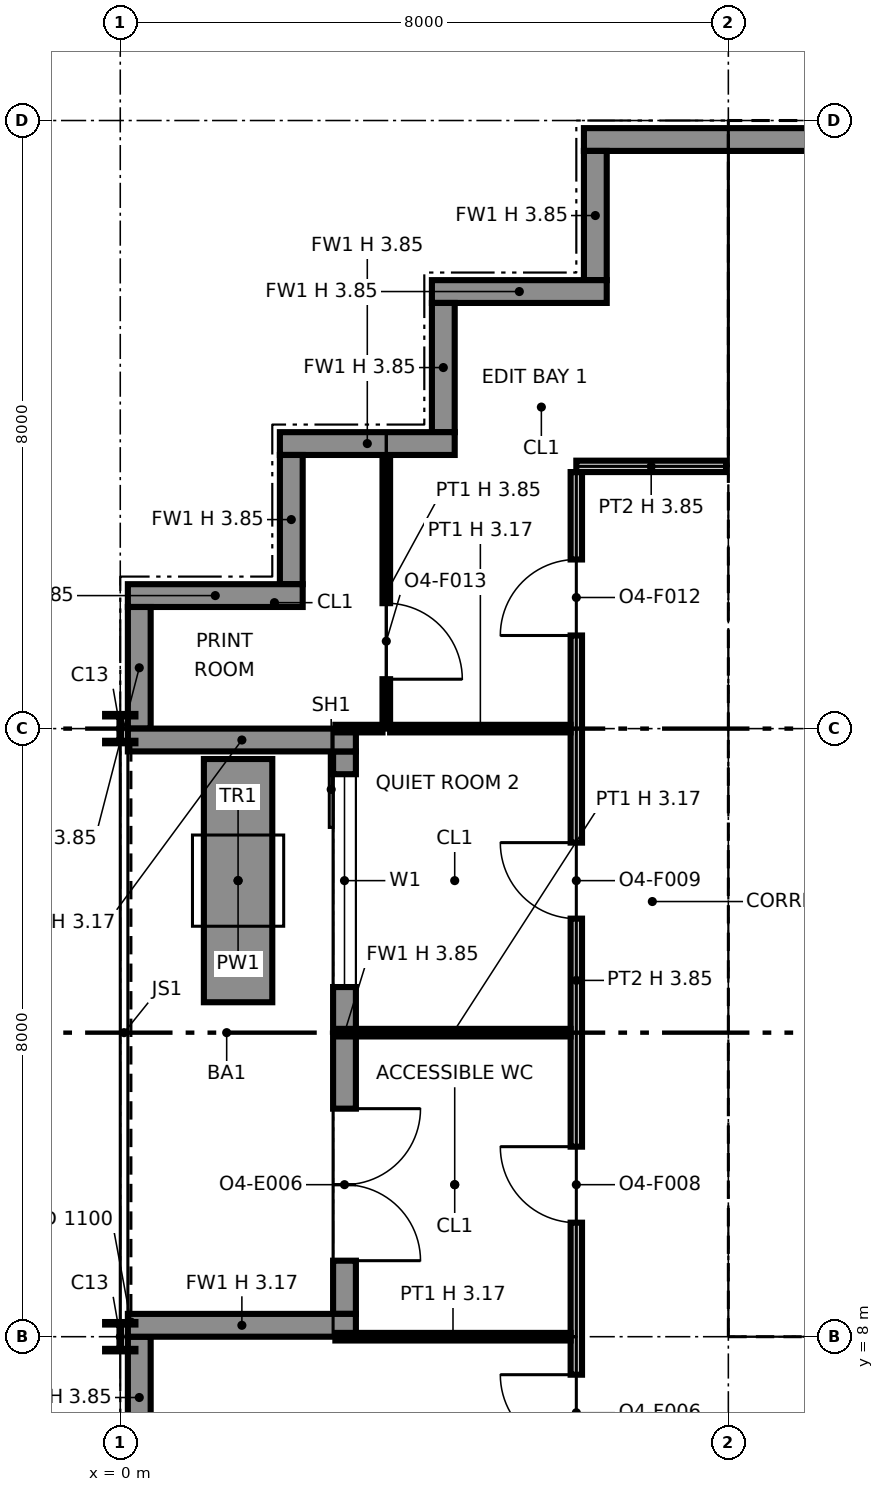
"""IFC4 building model, lengths in metres.
Left out: names, types, materials, properties, quantities, classifications, styles, units other than length and angle.
Written with IfcOpenShell. Run it as: python <this file> out.ifc"""

import sys

from ifc_helpers import new_model, si_unit, direction, frame, frame_2d, origin, origin_2d, place, context, subcontext, project, spatial, polyline, rectangle, i_section, outline, extrude, element, fill, save


model = new_model("IFC4")
c1 = context("Model", 3, precision=1e-05, world=origin(), true_north=direction((0.0, 1.0)))
c2 = subcontext(c1, "Body", "Model", "MODEL_VIEW")
j1 = project(units=[si_unit("LENGTHUNIT", "METRE"), si_unit("PLANEANGLEUNIT", "RADIAN")], contexts=[c1])
p1 = place(None, origin())
s1 = spatial("IfcSite", under=j1, at=p1, CompositionType="ELEMENT")
p2 = place(p1, origin())
s2 = spatial("IfcBuilding", under=s1, at=p2, CompositionType="ELEMENT")
p3 = place(p2, frame((0.0, 0.0, 217.0)))
s3 = spatial("IfcBuildingStorey", under=s2, at=p3, CompositionType="ELEMENT", Elevation=217.0)
for number, where, z_axis, x_axis in (
    (1, (0.0, 8.0, 0.0), (0.0, 0.0, 1.0), (1.0, 0.0, 0.0)),
    (2, (0.0, 16.0, 0.0), (0.0, 0.0, 1.0), (1.0, 0.0, 0.0)),
):
    element("IfcColumn", number, at=place(p3, frame(where, z_axis=z_axis, x_axis=x_axis)), inside=s3, PredefinedType="COLUMN", context=c2, shape_type="SweptSolid", body=[
        extrude(i_section(OverallWidth=0.399, OverallDepth=0.386, WebThickness=0.021, FlangeThickness=0.033, at=origin_2d()), origin(), (0.0, 0.0, 1.0), 3.85),
    ])
for number, where, z_axis, x_axis in (
    (3, (8.0, 8.0, 0.0), (0.0, 0.0, 1.0), (1.0, 0.0, 0.0)),
    (4, (8.0, 16.0, 0.0), (0.0, 0.0, 1.0), (1.0, 0.0, 0.0)),
):
    element("IfcColumn", number, at=place(p3, frame(where, z_axis=z_axis, x_axis=x_axis)), inside=s3, PredefinedType="COLUMN", context=c2, shape_type="SweptSolid", body=[
        extrude(i_section(OverallWidth=0.373, OverallDepth=0.368, WebThickness=0.015, FlangeThickness=0.024, at=origin_2d()), origin(), (0.0, 0.0, 1.0), 3.85),
    ])
p4 = place(p3, frame((8.0, 24.0, 0.0), z_axis=(0.0, 0.0, 1.0), x_axis=(1.0, 0.0, 0.0)))
e5 = element("IfcColumn", 5, at=p4, inside=s3, PredefinedType="COLUMN", context=c2, shape_type="SweptSolid", body=[
    extrude(i_section(OverallWidth=0.406, OverallDepth=0.417, WebThickness=0.03, FlangeThickness=0.048, at=origin_2d()), origin(), (0.0, 0.0, 1.0), 3.85),
])
p5 = place(p3, frame((32.0, 23.75, 0.0), z_axis=(0.0, 0.0, 1.0), x_axis=(-1.0, 0.0, 0.0)))
e6 = element("IfcWall", 6, at=p5, inside=s3, PredefinedType="SOLIDWALL", context=c2, shape_type="SweptSolid", body=[
    extrude(rectangle(XDim=25.9, YDim=0.3, at=frame_2d((12.95, 0.0))), origin(), (0.0, 0.0, 1.0), 3.85),
])
p6 = place(p3, frame((6.25, 23.6, 0.0), z_axis=(0.0, 0.0, 1.0), x_axis=(0.0, -1.0, 0.0)))
e7 = element("IfcWall", 7, at=p6, inside=s3, PredefinedType="SOLIDWALL", context=c2, shape_type="SweptSolid", body=[
    extrude(rectangle(XDim=1.7, YDim=0.3, at=frame_2d((0.85, 0.0))), origin(), (0.0, 0.0, 1.0), 3.85),
])
p7 = place(p3, frame((6.4, 21.75, 0.0), z_axis=(0.0, 0.0, 1.0), x_axis=(-1.0, 0.0, 0.0)))
e8 = element("IfcWall", 8, at=p7, inside=s3, PredefinedType="SOLIDWALL", context=c2, shape_type="SweptSolid", body=[
    extrude(rectangle(XDim=2.3, YDim=0.3, at=frame_2d((1.15, 0.0))), origin(), (0.0, 0.0, 1.0), 3.85),
])
p8 = place(p3, frame((4.25, 21.6, 0.0), z_axis=(0.0, 0.0, 1.0), x_axis=(0.0, -1.0, 0.0)))
e9 = element("IfcWall", 9, at=p8, inside=s3, PredefinedType="SOLIDWALL", context=c2, shape_type="SweptSolid", body=[
    extrude(rectangle(XDim=1.7, YDim=0.3, at=frame_2d((0.85, 0.0))), origin(), (0.0, 0.0, 1.0), 3.85),
])
p9 = place(p3, frame((4.4, 19.75, 0.0), z_axis=(0.0, 0.0, 1.0), x_axis=(-1.0, 0.0, 0.0)))
e10 = element("IfcWall", 10, at=p9, inside=s3, PredefinedType="SOLIDWALL", context=c2, shape_type="SweptSolid", body=[
    extrude(rectangle(XDim=2.3, YDim=0.3, at=frame_2d((1.15, 0.0))), origin(), (0.0, 0.0, 1.0), 3.85),
])
p10 = place(p3, frame((2.25, 19.6, 0.0), z_axis=(0.0, 0.0, 1.0), x_axis=(0.0, -1.0, 0.0)))
e11 = element("IfcWall", 11, at=p10, inside=s3, PredefinedType="SOLIDWALL", context=c2, shape_type="SweptSolid", body=[
    extrude(rectangle(XDim=1.7, YDim=0.3, at=frame_2d((0.85, 0.0))), origin(), (0.0, 0.0, 1.0), 3.85),
])
p11 = place(p3, frame((2.4, 17.75, 0.0), z_axis=(0.0, 0.0, 1.0), x_axis=(-1.0, 0.0, 0.0)))
e12 = element("IfcWall", 12, at=p11, inside=s3, PredefinedType="SOLIDWALL", context=c2, shape_type="SweptSolid", body=[
    extrude(rectangle(XDim=2.3, YDim=0.3, at=frame_2d((1.15, 0.0))), origin(), (0.0, 0.0, 1.0), 3.85),
])
p12 = place(p3, frame((0.25, 17.6, 0.0), z_axis=(0.0, 0.0, 1.0), x_axis=(0.0, -1.0, 0.0)))
e13 = element("IfcWall", 13, at=p12, inside=s3, PredefinedType="SOLIDWALL", context=c2, shape_type="SweptSolid", body=[
    extrude(rectangle(XDim=1.6, YDim=0.3, at=frame_2d((0.8, 0.0))), origin(), (0.0, 0.0, 1.0), 3.85),
])
p13 = place(p3, frame((2.95, 15.7, 0.0), z_axis=(0.0, 0.0, 1.0), x_axis=(0.0, -1.0, 0.0)))
e14 = element("IfcWall", 14, at=p13, inside=s3, PredefinedType="SOLIDWALL", context=c2, shape_type="SweptSolid", body=[
    extrude(rectangle(XDim=7.4, YDim=0.3, at=frame_2d((3.7, 0.0))), origin(), (0.0, 0.0, 1.0), 3.85),
])
p14 = place(p13, frame((0.3, 0.0, 0.9)))
e15 = element("IfcOpeningElement", 15, at=p14, cuts=e14, PredefinedType="OPENING", context=c2, shape_type="SweptSolid", body=[
    extrude(rectangle(XDim=2.8, YDim=2.2, at=frame_2d((1.4, 1.1))), frame((0.0, 0.16, 0.0), z_axis=(0.0, -1.0, 0.0), x_axis=(1.0, 0.0, 0.0)), (0.0, 0.0, 1.0), 0.32),
])
p15 = place(p13, frame((4.7, 0.0, 0.0)))
e16 = element("IfcOpeningElement", 16, at=p15, cuts=e14, PredefinedType="OPENING", context=c2, shape_type="SweptSolid", body=[
    extrude(rectangle(XDim=2.0, YDim=2.4, at=frame_2d((1.0, 1.2))), frame((0.0, 0.16, 0.0), z_axis=(0.0, -1.0, 0.0), x_axis=(1.0, 0.0, 0.0)), (0.0, 0.0, 1.0), 0.32),
])
for number, where, z_axis, x_axis in (
    (17, (0.1, 15.85, 0.0), (0.0, 0.0, 1.0), (1.0, 0.0, 0.0)),
    (18, (0.1, 8.15, 0.0), (0.0, 0.0, 1.0), (1.0, 0.0, 0.0)),
):
    element("IfcWall", number, at=place(p3, frame(where, z_axis=z_axis, x_axis=x_axis)), inside=s3, PredefinedType="SOLIDWALL", context=c2, shape_type="SweptSolid", body=[
        extrude(rectangle(XDim=3.0, YDim=0.3, at=frame_2d((1.5, 0.0))), origin(), (0.0, 0.0, 1.0), 3.171),
    ])
p16 = place(p3, frame((0.25, 8.0, 0.0), z_axis=(0.0, 0.0, 1.0), x_axis=(0.0, -1.0, 0.0)))
e19 = element("IfcWall", 19, at=p16, inside=s3, PredefinedType="SOLIDWALL", context=c2, shape_type="SweptSolid", body=[
    extrude(rectangle(XDim=1.6, YDim=0.3, at=frame_2d((0.8, 0.0))), origin(), (0.0, 0.0, 1.0), 3.85),
])
p17 = place(p3, frame((1.55, 15.6, 0.0), z_axis=(0.0, 0.0, 1.0), x_axis=(0.0, -1.0, 0.0)))
e20 = element("IfcWall", 20, at=p17, inside=s3, PredefinedType="SOLIDWALL", context=c2, shape_type="SweptSolid", body=[
    extrude(rectangle(XDim=3.2, YDim=0.9, at=frame_2d((1.6, 0.0))), origin(), (0.0, 0.0, 1.0), 0.6),
])
p18 = place(p3, frame((8.65, 8.75, 0.0), z_axis=(0.0, 0.0, 1.0), x_axis=(1.0, 0.0, 0.0)))
e21 = element("IfcWall", 21, at=p18, inside=s3, PredefinedType="PARTITIONING", context=c2, shape_type="SweptSolid", body=[
    extrude(outline(polyline([(0.0, 0.0), (14.7, 0.0), (14.7, 3.85), (7.438, 3.85), (7.438, 3.308), (7.262, 3.308), (7.261, 3.85), (0.0, 3.85), (0.0, 0.0)])), frame((0.0, 0.1, 0.0), z_axis=(0.0, -1.0, 0.0), x_axis=(1.0, 0.0, 0.0)), (0.0, 0.0, 1.0), 0.2),
])
p19 = place(p18, frame((1.3, 0.0, 0.0)))
e22 = element("IfcOpeningElement", 22, at=p19, cuts=e21, PredefinedType="OPENING", context=c2, shape_type="SweptSolid", body=[
    extrude(rectangle(XDim=1.4, YDim=2.1, at=frame_2d((0.7, 1.05))), frame((0.0, 0.11, 0.0), z_axis=(0.0, -1.0, 0.0), x_axis=(1.0, 0.0, 0.0)), (0.0, 0.0, 1.0), 0.22),
])
p20 = place(p18, frame((4.6, 0.0, 0.0)))
e23 = element("IfcOpeningElement", 23, at=p20, cuts=e21, PredefinedType="OPENING", context=c2, shape_type="SweptSolid", body=[
    extrude(rectangle(XDim=1.4, YDim=2.1, at=frame_2d((0.7, 1.05))), frame((0.0, 0.11, 0.0), z_axis=(0.0, -1.0, 0.0), x_axis=(1.0, 0.0, 0.0)), (0.0, 0.0, 1.0), 0.22),
])
p21 = place(p18, frame((10.4, 0.0, 0.0)))
e24 = element("IfcOpeningElement", 24, at=p21, cuts=e21, PredefinedType="OPENING", context=c2, shape_type="SweptSolid", body=[
    extrude(rectangle(XDim=1.2, YDim=2.1, at=frame_2d((0.6, 1.05))), frame((0.0, 0.11, 0.0), z_axis=(0.0, -1.0, 0.0), x_axis=(1.0, 0.0, 0.0)), (0.0, 0.0, 1.0), 0.22),
])
p22 = place(p3, frame((8.75, 8.85, 0.0), z_axis=(0.0, 0.0, 1.0), x_axis=(0.0, 1.0, 0.0)))
e25 = element("IfcWall", 25, at=p22, inside=s3, PredefinedType="PARTITIONING", context=c2, shape_type="SweptSolid", body=[
    extrude(outline(polyline([(0.0, 0.0), (14.3, 0.0), (14.3, 3.85), (10.225, 3.85), (10.224, 3.44), (10.076, 3.44), (10.075, 3.85), (7.239, 3.85), (7.238, 3.308), (7.062, 3.308), (7.062, 3.85), (0.0, 3.85), (0.0, 0.0)])), frame((0.0, 0.1, 0.0), z_axis=(0.0, -1.0, 0.0), x_axis=(1.0, 0.0, 0.0)), (0.0, 0.0, 1.0), 0.2),
])
p23 = place(p22, frame((8.3, 0.0, 0.0)))
e26 = element("IfcOpeningElement", 26, at=p23, cuts=e25, PredefinedType="OPENING", context=c2, shape_type="SweptSolid", body=[
    extrude(rectangle(XDim=1.8, YDim=2.1, at=frame_2d((0.9, 1.05))), frame((0.0, 0.11, 0.0), z_axis=(0.0, -1.0, 0.0), x_axis=(1.0, 0.0, 0.0)), (0.0, 0.0, 1.0), 0.22),
])
p24 = place(p3, frame((8.65, 23.25, 0.0), z_axis=(0.0, 0.0, 1.0), x_axis=(1.0, 0.0, 0.0)))
e27 = element("IfcWall", 27, at=p24, inside=s3, PredefinedType="PARTITIONING", context=c2, shape_type="SweptSolid", body=[
    extrude(outline(polyline([(0.0, 0.0), (14.7, 0.0), (14.7, 3.85), (7.438, 3.85), (7.438, 3.308), (7.262, 3.308), (7.261, 3.85), (0.0, 3.85), (0.0, 0.0)])), frame((0.0, 0.1, 0.0), z_axis=(0.0, -1.0, 0.0), x_axis=(1.0, 0.0, 0.0)), (0.0, 0.0, 1.0), 0.2),
])
p25 = place(p3, frame((8.85, 16.0, 0.0), z_axis=(0.0, 0.0, 1.0), x_axis=(1.0, 0.0, 0.0)))
e28 = element("IfcWall", 28, at=p25, inside=s3, PredefinedType="PARTITIONING", context=c2, shape_type="SweptSolid", body=[
    extrude(rectangle(XDim=6.953, YDim=0.6, at=frame_2d((3.477, 0.0))), origin(), (0.0, 0.0, 1.0), 3.308),
])
p26 = place(p3, frame((8.85, 19.9, 0.0), z_axis=(0.0, 0.0, 1.0), x_axis=(1.0, 0.0, 0.0)))
e29 = element("IfcWall", 29, at=p26, inside=s3, PredefinedType="PARTITIONING", context=c2, shape_type="SweptSolid", body=[
    extrude(outline(polyline([(0.0, 0.0), (14.3, 0.0), (14.3, 3.85), (7.239, 3.85), (7.238, 3.308), (7.062, 3.308), (7.062, 3.85), (0.0, 3.85), (0.0, 0.0)])), frame((0.0, 0.1, 0.0), z_axis=(0.0, -1.0, 0.0), x_axis=(1.0, 0.0, 0.0)), (0.0, 0.0, 1.0), 0.2),
])
p27 = place(p26, frame((2.125, 0.0, 0.0)))
e30 = element("IfcOpeningElement", 30, at=p27, cuts=e29, PredefinedType="OPENING", context=c2, shape_type="SweptSolid", body=[
    extrude(rectangle(XDim=0.9, YDim=2.1, at=frame_2d((0.45, 1.05))), frame((0.0, 0.11, 0.0), z_axis=(0.0, -1.0, 0.0), x_axis=(1.0, 0.0, 0.0)), (0.0, 0.0, 1.0), 0.22),
])
p28 = place(p26, frame((5.65, 0.0, 0.0)))
e31 = element("IfcOpeningElement", 31, at=p28, cuts=e29, PredefinedType="OPENING", context=c2, shape_type="SweptSolid", body=[
    extrude(rectangle(XDim=1.1, YDim=2.1, at=frame_2d((0.55, 1.05))), frame((0.0, 0.11, 0.0), z_axis=(0.0, -1.0, 0.0), x_axis=(1.0, 0.0, 0.0)), (0.0, 0.0, 1.0), 0.22),
])
p29 = place(p26, frame((7.95, 0.0, 0.0)))
e32 = element("IfcOpeningElement", 32, at=p29, cuts=e29, PredefinedType="OPENING", context=c2, shape_type="SweptSolid", body=[
    extrude(rectangle(XDim=1.1, YDim=2.1, at=frame_2d((0.55, 1.05))), frame((0.0, 0.11, 0.0), z_axis=(0.0, -1.0, 0.0), x_axis=(1.0, 0.0, 0.0)), (0.0, 0.0, 1.0), 0.22),
])
p30 = place(p26, frame((10.25, 0.0, 0.0)))
e33 = element("IfcOpeningElement", 33, at=p30, cuts=e29, PredefinedType="OPENING", context=c2, shape_type="SweptSolid", body=[
    extrude(rectangle(XDim=1.1, YDim=2.1, at=frame_2d((0.55, 1.05))), frame((0.0, 0.11, 0.0), z_axis=(0.0, -1.0, 0.0), x_axis=(1.0, 0.0, 0.0)), (0.0, 0.0, 1.0), 0.22),
])
p31 = place(p26, frame((12.625, 0.0, 0.0)))
e34 = element("IfcOpeningElement", 34, at=p31, cuts=e29, PredefinedType="OPENING", context=c2, shape_type="SweptSolid", body=[
    extrude(rectangle(XDim=1.1, YDim=2.1, at=frame_2d((0.55, 1.05))), frame((0.0, 0.11, 0.0), z_axis=(0.0, -1.0, 0.0), x_axis=(1.0, 0.0, 0.0)), (0.0, 0.0, 1.0), 0.22),
])
p32 = place(p3, frame((6.0, 6.0, 0.0), z_axis=(0.0, 0.0, 1.0), x_axis=(0.0, 1.0, 0.0)))
e35 = element("IfcWall", 35, at=p32, inside=s3, PredefinedType="PARTITIONING", context=c2, shape_type="SweptSolid", body=[
    extrude(outline(polyline([(0.0, 0.0), (13.375, 0.0), (13.375, 3.85), (10.3, 3.85), (10.298, 3.172), (9.702, 3.172), (9.7, 3.85), (6.3, 3.85), (6.298, 3.172), (5.702, 3.172), (5.7, 3.85), (2.3, 3.85), (2.298, 3.172), (1.702, 3.172), (1.7, 3.85), (0.0, 3.85), (0.0, 0.0)])), frame((0.0, 0.075, 0.0), z_axis=(0.0, -1.0, 0.0), x_axis=(1.0, 0.0, 0.0)), (0.0, 0.0, 1.0), 0.15),
])
p33 = place(p32, frame((0.5, 0.0, 0.0)))
e36 = element("IfcOpeningElement", 36, at=p33, cuts=e35, PredefinedType="OPENING", context=c2, shape_type="SweptSolid", body=[
    extrude(rectangle(XDim=1.0, YDim=2.1, at=frame_2d((0.5, 1.05))), frame((0.0, 0.085, 0.0), z_axis=(0.0, -1.0, 0.0), x_axis=(1.0, 0.0, 0.0)), (0.0, 0.0, 1.0), 0.17),
])
p34 = place(p32, frame((3.5, 0.0, 0.0)))
e37 = element("IfcOpeningElement", 37, at=p34, cuts=e35, PredefinedType="OPENING", context=c2, shape_type="SweptSolid", body=[
    extrude(rectangle(XDim=1.0, YDim=2.1, at=frame_2d((0.5, 1.05))), frame((0.0, 0.085, 0.0), z_axis=(0.0, -1.0, 0.0), x_axis=(1.0, 0.0, 0.0)), (0.0, 0.0, 1.0), 0.17),
])
p35 = place(p32, frame((7.5, 0.0, 0.0)))
e38 = element("IfcOpeningElement", 38, at=p35, cuts=e35, PredefinedType="OPENING", context=c2, shape_type="SweptSolid", body=[
    extrude(rectangle(XDim=1.0, YDim=2.1, at=frame_2d((0.5, 1.05))), frame((0.0, 0.085, 0.0), z_axis=(0.0, -1.0, 0.0), x_axis=(1.0, 0.0, 0.0)), (0.0, 0.0, 1.0), 0.17),
])
p36 = place(p32, frame((11.225, 0.0, 0.0)))
e39 = element("IfcOpeningElement", 39, at=p36, cuts=e35, PredefinedType="OPENING", context=c2, shape_type="SweptSolid", body=[
    extrude(rectangle(XDim=1.0, YDim=2.1, at=frame_2d((0.5, 1.05))), frame((0.0, 0.085, 0.0), z_axis=(0.0, -1.0, 0.0), x_axis=(1.0, 0.0, 0.0)), (0.0, 0.0, 1.0), 0.17),
])
for number, where, z_axis, x_axis in (
    (40, (2.83, 8.0, 0.0), (0.0, 0.0, 1.0), (1.0, 0.0, 0.0)),
    (41, (2.83, 12.0, 0.0), (0.0, 0.0, 1.0), (1.0, 0.0, 0.0)),
):
    element("IfcWall", number, at=place(p3, frame(where, z_axis=z_axis, x_axis=x_axis)), inside=s3, PredefinedType="PARTITIONING", context=c2, shape_type="SweptSolid", body=[
        extrude(rectangle(XDim=3.095, YDim=0.1, at=frame_2d((1.547, 0.0))), origin(), (0.0, 0.0, 1.0), 3.172),
    ])
p37 = place(p3, frame((2.83, 16.0, 0.0), z_axis=(0.0, 0.0, 1.0), x_axis=(1.0, 0.0, 0.0)))
e42 = element("IfcWall", 42, at=p37, inside=s3, PredefinedType="PARTITIONING", context=c2, shape_type="SweptSolid", body=[
    extrude(rectangle(XDim=0.62, YDim=0.1, at=frame_2d((0.31, 0.0))), origin(), (0.0, 0.0, 1.0), 3.172),
])
p38 = place(p3, frame((3.55, 16.0, 0.0), z_axis=(0.0, 0.0, 1.0), x_axis=(1.0, 0.0, 0.0)))
e43 = element("IfcWall", 43, at=p38, inside=s3, PredefinedType="PARTITIONING", context=c2, shape_type="SweptSolid", body=[
    extrude(rectangle(XDim=2.375, YDim=0.1, at=frame_2d((1.188, 0.0))), origin(), (0.0, 0.0, 1.0), 3.172),
])
p39 = place(p3, frame((3.5, 16.0, 0.0), z_axis=(0.0, 0.0, 1.0), x_axis=(0.0, 1.0, 0.0)))
e44 = element("IfcWall", 44, at=p39, inside=s3, PredefinedType="PARTITIONING", context=c2, shape_type="SweptSolid", body=[
    extrude(rectangle(XDim=3.57, YDim=0.1, at=frame_2d((1.785, 0.0))), origin(), (0.0, 0.0, 1.0), 3.85),
])
p40 = place(p39, frame((1.65, 0.0, 0.0), z_axis=(0.0, 0.0, 1.0), x_axis=(-1.0, 0.0, 0.0)))
e45 = element("IfcOpeningElement", 45, at=p40, cuts=e44, PredefinedType="OPENING", context=c2, shape_type="SweptSolid", body=[
    extrude(rectangle(XDim=1.0, YDim=2.1, at=frame_2d((0.5, 1.05))), frame((0.0, 0.06, 0.0), z_axis=(0.0, -1.0, 0.0), x_axis=(1.0, 0.0, 0.0)), (0.0, 0.0, 1.0), 0.12),
])
p41 = place(p3, frame((6.0, 19.45, 0.0), z_axis=(0.0, 0.0, 1.0), x_axis=(1.0, 0.0, 0.0)))
e46 = element("IfcWall", 46, at=p41, inside=s3, PredefinedType="PARTITIONING", context=c2, shape_type="SweptSolid", body=[
    extrude(rectangle(XDim=1.97, YDim=0.15, at=frame_2d((0.985, 0.0))), origin(), (0.0, 0.0, 1.0), 3.85),
])
p42 = place(p14, origin())
e47 = element("IfcWindow", 47, at=p42, inside=s3, PartitioningType="SINGLE_PANEL", PredefinedType="WINDOW", context=c2, shape_type="SweptSolid", body=[
    extrude(rectangle(XDim=2.8, YDim=2.2, at=frame_2d((1.4, 1.1))), frame((0.0, 0.03, 0.0), z_axis=(0.0, -1.0, 0.0), x_axis=(1.0, 0.0, 0.0)), (0.0, 0.0, 1.0), 0.06),
])
fill(e15, e47)
p43 = place(p15, origin())
e48 = element("IfcDoor", 48, at=p43, inside=s3, OperationType="DOUBLE_DOOR_SINGLE_SWING", PredefinedType="DOOR", context=c2, shape_type="SweptSolid", body=[
    extrude(rectangle(XDim=2.0, YDim=2.4, at=frame_2d((1.0, 1.2))), frame((0.0, 0.025, 0.0), z_axis=(0.0, -1.0, 0.0), x_axis=(1.0, 0.0, 0.0)), (0.0, 0.0, 1.0), 0.05),
])
fill(e16, e48)
p44 = place(p23, origin())
e49 = element("IfcDoor", 49, at=p44, inside=s3, OperationType="DOUBLE_DOOR_SINGLE_SWING", PredefinedType="NOTDEFINED", context=c2, shape_type="SweptSolid", body=[
    extrude(rectangle(XDim=1.8, YDim=2.1, at=frame_2d((0.9, 1.05))), frame((0.0, 0.025, 0.0), z_axis=(0.0, -1.0, 0.0), x_axis=(1.0, 0.0, 0.0)), (0.0, 0.0, 1.0), 0.05),
])
fill(e26, e49)
p45 = place(p33, origin())
e50 = element("IfcDoor", 50, at=p45, inside=s3, OperationType="SINGLE_SWING_RIGHT", PredefinedType="DOOR", context=c2, shape_type="SweptSolid", body=[
    extrude(rectangle(XDim=1.0, YDim=2.1, at=frame_2d((0.5, 1.05))), frame((0.0, 0.025, 0.0), z_axis=(0.0, -1.0, 0.0), x_axis=(1.0, 0.0, 0.0)), (0.0, 0.0, 1.0), 0.05),
])
fill(e36, e50)
p46 = place(p34, origin())
e51 = element("IfcDoor", 51, at=p46, inside=s3, OperationType="SINGLE_SWING_RIGHT", PredefinedType="DOOR", context=c2, shape_type="SweptSolid", body=[
    extrude(rectangle(XDim=1.0, YDim=2.1, at=frame_2d((0.5, 1.05))), frame((0.0, 0.025, 0.0), z_axis=(0.0, -1.0, 0.0), x_axis=(1.0, 0.0, 0.0)), (0.0, 0.0, 1.0), 0.05),
])
fill(e37, e51)
p47 = place(p35, origin())
e52 = element("IfcDoor", 52, at=p47, inside=s3, OperationType="SINGLE_SWING_RIGHT", PredefinedType="DOOR", context=c2, shape_type="SweptSolid", body=[
    extrude(rectangle(XDim=1.0, YDim=2.1, at=frame_2d((0.5, 1.05))), frame((0.0, 0.025, 0.0), z_axis=(0.0, -1.0, 0.0), x_axis=(1.0, 0.0, 0.0)), (0.0, 0.0, 1.0), 0.05),
])
fill(e38, e52)
p48 = place(p36, origin())
e53 = element("IfcDoor", 53, at=p48, inside=s3, OperationType="SINGLE_SWING_LEFT", PredefinedType="DOOR", context=c2, shape_type="SweptSolid", body=[
    extrude(rectangle(XDim=1.0, YDim=2.1, at=frame_2d((0.5, 1.05))), frame((0.0, 0.025, 0.0), z_axis=(0.0, -1.0, 0.0), x_axis=(1.0, 0.0, 0.0)), (0.0, 0.0, 1.0), 0.05),
])
fill(e39, e53)
p49 = place(p40, origin())
e54 = element("IfcDoor", 54, at=p49, inside=s3, OperationType="SINGLE_SWING_RIGHT", PredefinedType="DOOR", context=c2, shape_type="SweptSolid", body=[
    extrude(rectangle(XDim=1.0, YDim=2.1, at=frame_2d((0.5, 1.05))), frame((0.0, 0.025, 0.0), z_axis=(0.0, -1.0, 0.0), x_axis=(1.0, 0.0, 0.0)), (0.0, 0.0, 1.0), 0.05),
])
fill(e45, e54)
save(model, sys.argv[1])
